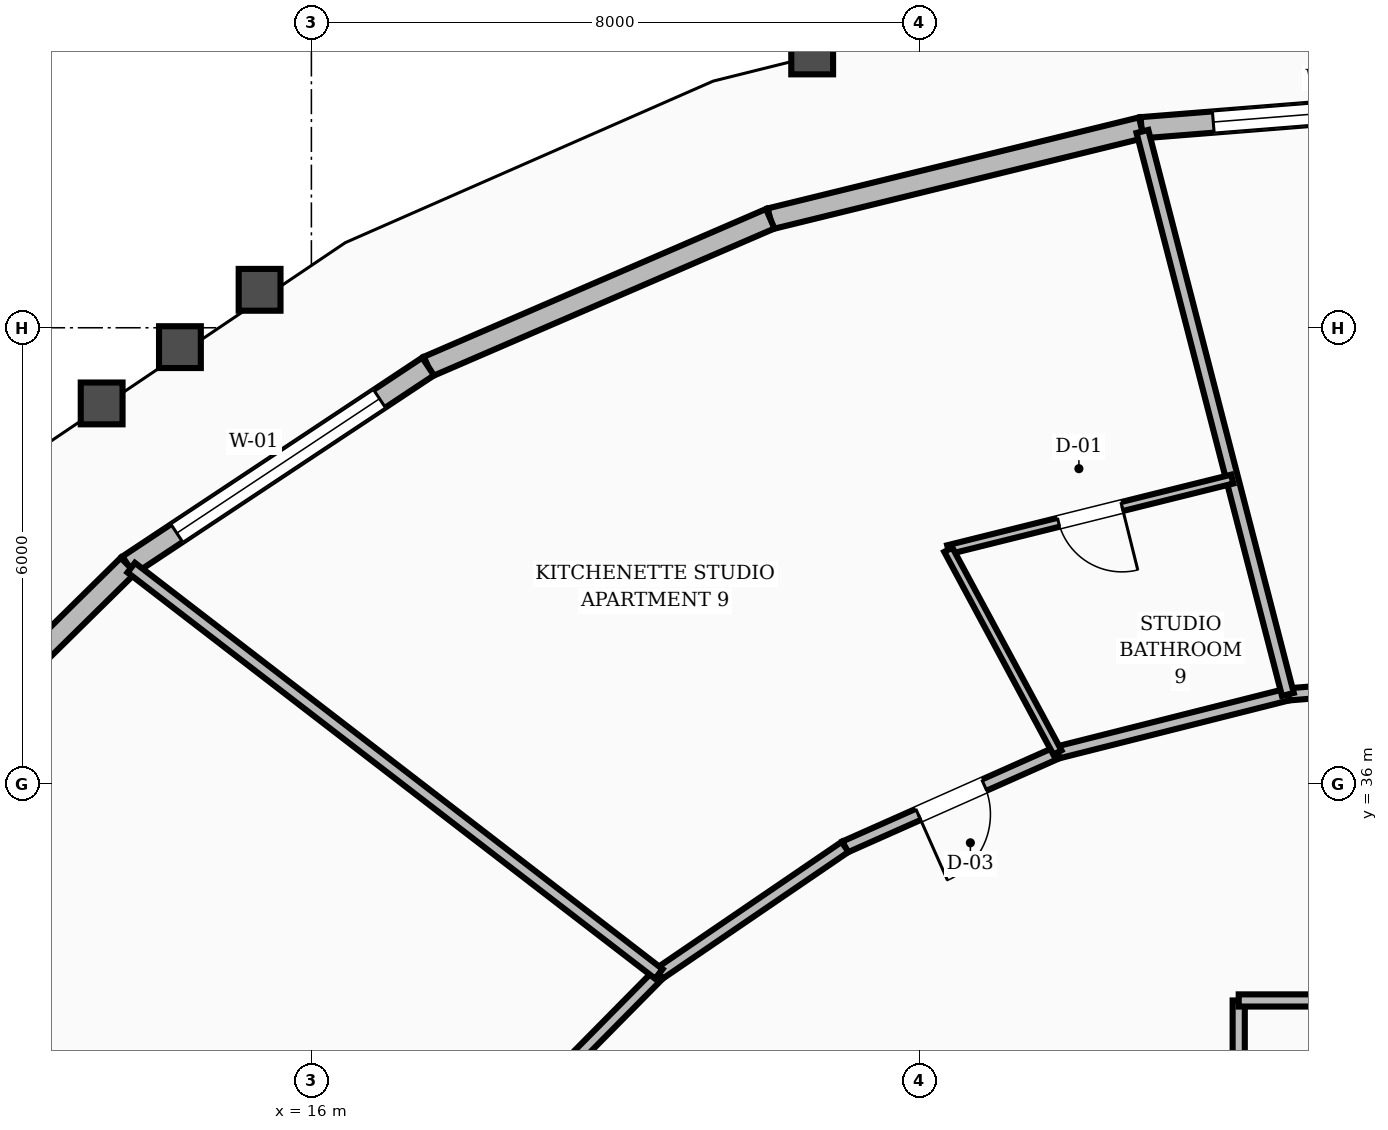
"""IFC4 building model, lengths in metres.
Left out: names, types, materials, properties, quantities, classifications, styles, units other than length and angle.
Written with IfcOpenShell. Run it as: python <this file> out.ifc"""

import sys

from ifc_helpers import new_model, si_unit, direction, frame, frame_2d, origin, place, context, subcontext, project, spatial, rectangle, extrude, element, fill, save


model = new_model("IFC4")
c1 = context("Model", 3, precision=1e-05, world=origin(), true_north=direction((0.0, 1.0)))
c2 = subcontext(c1, "Body", "Model", "MODEL_VIEW")
j1 = project(units=[si_unit("LENGTHUNIT", "METRE"), si_unit("PLANEANGLEUNIT", "RADIAN")], contexts=[c1])
p1 = place(None, origin())
s1 = spatial("IfcSite", under=j1, at=p1, CompositionType="ELEMENT")
p2 = place(p1, origin())
s2 = spatial("IfcBuilding", under=s1, at=p2, CompositionType="ELEMENT")
p3 = place(p2, frame((0.0, 0.0, 41.2)))
s3 = spatial("IfcBuildingStorey", under=s2, at=p3, CompositionType="ELEMENT", Elevation=41.2)
p4 = place(p3, frame((32.0, 45.035, 0.0), z_axis=(0.0, 0.0, 1.0), x_axis=(-0.996847191649, -0.079345299177, 0.0)))
e1 = element("IfcWall", 1, at=p4, inside=s3, PredefinedType="STANDARD", context=c2, shape_type="SweptSolid", body=[
    extrude(rectangle(XDim=5.095, YDim=0.28, at=frame_2d((2.548, 0.0))), origin(), (0.0, 0.0, 1.0), 2.65),
])
p5 = place(p4, frame((0.948, 0.0, 0.8)))
e2 = element("IfcOpeningElement", 2, at=p5, cuts=e1, PredefinedType="OPENING", context=c2, shape_type="SweptSolid", body=[
    extrude(rectangle(XDim=3.2, YDim=1.65, at=frame_2d((1.6, 0.825))), frame((0.0, 0.15, 0.0), z_axis=(0.0, -1.0, 0.0), x_axis=(1.0, 0.0, 0.0)), (0.0, 0.0, 1.0), 0.3),
])
p6 = place(p3, frame((26.921, 44.631, 0.0), z_axis=(0.0, 0.0, 1.0), x_axis=(-0.971254487448, -0.238043526716, 0.0)))
e3 = element("IfcWall", 3, at=p6, inside=s3, PredefinedType="STANDARD", context=c2, shape_type="SweptSolid", body=[
    extrude(rectangle(XDim=5.029, YDim=0.28, at=frame_2d((2.514, 0.0))), origin(), (0.0, 0.0, 1.0), 2.65),
])
p7 = place(p3, frame((22.037, 43.434, 0.0), z_axis=(0.0, 0.0, 1.0), x_axis=(-0.918052056251, -0.396459861793, 0.0)))
e4 = element("IfcWall", 4, at=p7, inside=s3, PredefinedType="STANDARD", context=c2, shape_type="SweptSolid", body=[
    extrude(rectangle(XDim=4.903, YDim=0.28, at=frame_2d((2.452, 0.0))), origin(), (0.0, 0.0, 1.0), 2.65),
])
p8 = place(p3, frame((17.535, 41.49, 0.0), z_axis=(0.0, 0.0, 1.0), x_axis=(-0.833436218894, -0.552615661229, 0.0)))
e5 = element("IfcWall", 5, at=p8, inside=s3, PredefinedType="STANDARD", context=c2, shape_type="SweptSolid", body=[
    extrude(rectangle(XDim=4.734, YDim=0.28, at=frame_2d((2.367, 0.0))), origin(), (0.0, 0.0, 1.0), 2.65),
])
p9 = place(p8, frame((0.767, 0.0, 0.8)))
e6 = element("IfcOpeningElement", 6, at=p9, cuts=e5, PredefinedType="OPENING", context=c2, shape_type="SweptSolid", body=[
    extrude(rectangle(XDim=3.2, YDim=1.65, at=frame_2d((1.6, 0.825))), frame((0.0, 0.15, 0.0), z_axis=(0.0, -1.0, 0.0), x_axis=(1.0, 0.0, 0.0)), (0.0, 0.0, 1.0), 0.3),
])
p10 = place(p3, frame((13.59, 38.874, 0.0), z_axis=(0.0, 0.0, 1.0), x_axis=(-0.712592855148, -0.701577809506, 0.0)))
e7 = element("IfcWall", 7, at=p10, inside=s3, PredefinedType="STANDARD", context=c2, shape_type="SweptSolid", body=[
    extrude(rectangle(XDim=4.544, YDim=0.28, at=frame_2d((2.272, 0.0))), origin(), (0.0, 0.0, 1.0), 2.65),
])
p11 = place(p3, frame((28.2, 31.45, 0.0), z_axis=(0.0, 0.0, 1.0), x_axis=(0.0, 1.0, 0.0)))
e8 = element("IfcWall", 8, at=p11, inside=s3, PredefinedType="SOLIDWALL", context=c2, shape_type="SweptSolid", body=[
    extrude(rectangle(XDim=1.7, YDim=0.16, at=frame_2d((0.85, 0.0))), origin(), (0.0, 0.0, 1.0), 2.61),
])
p12 = place(p3, frame((28.2, 33.15, 0.0), z_axis=(0.0, 0.0, 1.0), x_axis=(1.0, 0.0, 0.0)))
e9 = element("IfcWall", 9, at=p12, inside=s3, PredefinedType="SOLIDWALL", context=c2, shape_type="SweptSolid", body=[
    extrude(rectangle(XDim=7.6, YDim=0.16, at=frame_2d((3.8, 0.0))), origin(), (0.0, 0.0, 1.0), 2.61),
])
p13 = place(p12, frame((3.2, 0.0, 0.0)))
e10 = element("IfcOpeningElement", 10, at=p13, cuts=e9, PredefinedType="OPENING", context=c2, shape_type="SweptSolid", body=[
    extrude(rectangle(XDim=1.2, YDim=2.1, at=frame_2d((0.6, 1.05))), frame((0.0, 0.09, 0.0), z_axis=(0.0, -1.0, 0.0), x_axis=(1.0, 0.0, 0.0)), (0.0, 0.0, 1.0), 0.18),
])
p14 = place(p3, frame((32.0, 37.434, 0.0), z_axis=(0.0, 0.0, 1.0), x_axis=(-0.996661331307, -0.081646743207, 0.0)))
e11 = element("IfcWall", 11, at=p14, inside=s3, PredefinedType="SOLIDWALL", context=c2, shape_type="SweptSolid", body=[
    extrude(rectangle(XDim=3.164, YDim=0.16, at=frame_2d((1.582, 0.0))), origin(), (0.0, 0.0, 1.0), 2.61),
])
p15 = place(p14, frame((1.107, 0.0, 0.0)))
e12 = element("IfcOpeningElement", 12, at=p15, cuts=e11, PredefinedType="OPENING", context=c2, shape_type="SweptSolid", body=[
    extrude(rectangle(XDim=0.95, YDim=2.1, at=frame_2d((0.475, 1.05))), frame((0.0, 0.09, 0.0), z_axis=(0.0, -1.0, 0.0), x_axis=(1.0, 0.0, 0.0)), (0.0, 0.0, 1.0), 0.18),
])
p16 = place(p3, frame((28.847, 37.176, 0.0), z_axis=(0.0, 0.0, 1.0), x_axis=(-0.969653665365, -0.244482656326, 0.0)))
e13 = element("IfcWall", 13, at=p16, inside=s3, PredefinedType="SOLIDWALL", context=c2, shape_type="SweptSolid", body=[
    extrude(rectangle(XDim=3.127, YDim=0.16, at=frame_2d((1.563, 0.0))), origin(), (0.0, 0.0, 1.0), 2.61),
])
p17 = place(p3, frame((25.815, 36.411, 0.0), z_axis=(0.0, 0.0, 1.0), x_axis=(-0.913860932409, -0.406027334321, 0.0)))
e14 = element("IfcWall", 14, at=p17, inside=s3, PredefinedType="SOLIDWALL", context=c2, shape_type="SweptSolid", body=[
    extrude(rectangle(XDim=3.058, YDim=0.16, at=frame_2d((1.529, 0.0))), origin(), (0.0, 0.0, 1.0), 2.61),
])
p18 = place(p17, frame((1.054, 0.0, 0.0)))
e15 = element("IfcOpeningElement", 15, at=p18, cuts=e14, PredefinedType="OPENING", context=c2, shape_type="SweptSolid", body=[
    extrude(rectangle(XDim=0.95, YDim=2.1, at=frame_2d((0.475, 1.05))), frame((0.0, 0.09, 0.0), z_axis=(0.0, -1.0, 0.0), x_axis=(1.0, 0.0, 0.0)), (0.0, 0.0, 1.0), 0.18),
])
p19 = place(p3, frame((23.021, 35.17, 0.0), z_axis=(0.0, 0.0, 1.0), x_axis=(-0.826112340767, -0.563505457323, 0.0)))
e16 = element("IfcWall", 16, at=p19, inside=s3, PredefinedType="SOLIDWALL", context=c2, shape_type="SweptSolid", body=[
    extrude(rectangle(XDim=2.965, YDim=0.16, at=frame_2d((1.482, 0.0))), origin(), (0.0, 0.0, 1.0), 2.61),
])
p20 = place(p3, frame((20.572, 33.499, 0.0), z_axis=(0.0, 0.0, 1.0), x_axis=(-0.702569520063, -0.711615113301, 0.0)))
e17 = element("IfcWall", 17, at=p20, inside=s3, PredefinedType="SOLIDWALL", context=c2, shape_type="SweptSolid", body=[
    extrude(rectangle(XDim=2.861, YDim=0.16, at=frame_2d((1.43, 0.0))), origin(), (0.0, 0.0, 1.0), 2.61),
])
p21 = place(p3, frame((28.847, 37.176, 0.0), z_axis=(0.0, 0.0, 1.0), x_axis=(-0.250164663108, 0.968203305784, 0.0)))
e18 = element("IfcWall", 18, at=p21, inside=s3, PredefinedType="SOLIDWALL", context=c2, shape_type="SweptSolid", body=[
    extrude(rectangle(XDim=7.65, YDim=0.16, at=frame_2d((3.825, 0.0))), origin(), (0.0, 0.0, 1.0), 2.61),
])
p22 = place(p3, frame((28.115, 40.009, 0.0), z_axis=(0.0, 0.0, 1.0), x_axis=(-0.97045879352, -0.241266927034, 0.0)))
e19 = element("IfcWall", 19, at=p22, inside=s3, PredefinedType="PARTITIONING", context=c2, shape_type="SweptSolid", body=[
    extrude(rectangle(XDim=3.849, YDim=0.12, at=frame_2d((1.925, 0.0))), origin(), (0.0, 0.0, 1.0), 2.61),
])
p23 = place(p22, frame((1.495, 0.0, 0.0)))
e20 = element("IfcOpeningElement", 20, at=p23, cuts=e19, PredefinedType="OPENING", context=c2, shape_type="SweptSolid", body=[
    extrude(rectangle(XDim=0.86, YDim=2.1, at=frame_2d((0.43, 1.05))), frame((0.0, 0.07, 0.0), z_axis=(0.0, -1.0, 0.0), x_axis=(1.0, 0.0, 0.0)), (0.0, 0.0, 1.0), 0.14),
])
p24 = place(p3, frame((25.815, 36.411, 0.0), z_axis=(0.0, 0.0, 1.0), x_axis=(-0.473792323472, 0.880636607358, 0.0)))
e21 = element("IfcWall", 21, at=p24, inside=s3, PredefinedType="PARTITIONING", context=c2, shape_type="SweptSolid", body=[
    extrude(rectangle(XDim=3.031, YDim=0.12, at=frame_2d((1.515, 0.0))), origin(), (0.0, 0.0, 1.0), 2.61),
])
p25 = place(p3, frame((20.572, 33.499, 0.0), z_axis=(0.0, 0.0, 1.0), x_axis=(-0.792372185587, 0.610037965629, 0.0)))
e22 = element("IfcWall", 22, at=p25, inside=s3, PredefinedType="SOLIDWALL", context=c2, shape_type="SweptSolid", body=[
    extrude(rectangle(XDim=8.761, YDim=0.16, at=frame_2d((4.38, 0.0))), origin(), (0.0, 0.0, 1.0), 2.61),
])
p26 = place(p5, origin())
e23 = element("IfcWindow", 23, at=p26, inside=s3, PartitioningType="SINGLE_PANEL", PredefinedType="WINDOW", context=c2, shape_type="SweptSolid", body=[
    extrude(rectangle(XDim=3.2, YDim=1.65, at=frame_2d((1.6, 0.825))), frame((0.0, 0.03, 0.0), z_axis=(0.0, -1.0, 0.0), x_axis=(1.0, 0.0, 0.0)), (0.0, 0.0, 1.0), 0.06),
])
fill(e2, e23)
p27 = place(p9, origin())
e24 = element("IfcWindow", 24, at=p27, inside=s3, PartitioningType="SINGLE_PANEL", PredefinedType="WINDOW", context=c2, shape_type="SweptSolid", body=[
    extrude(rectangle(XDim=3.2, YDim=1.65, at=frame_2d((1.6, 0.825))), frame((0.0, 0.03, 0.0), z_axis=(0.0, -1.0, 0.0), x_axis=(1.0, 0.0, 0.0)), (0.0, 0.0, 1.0), 0.06),
])
fill(e6, e24)
p28 = place(p23, origin())
e25 = element("IfcDoor", 25, at=p28, inside=s3, OperationType="SINGLE_SWING_LEFT", PredefinedType="DOOR", context=c2, shape_type="SweptSolid", body=[
    extrude(rectangle(XDim=0.86, YDim=2.1, at=frame_2d((0.43, 1.05))), frame((0.0, 0.025, 0.0), z_axis=(0.0, -1.0, 0.0), x_axis=(1.0, 0.0, 0.0)), (0.0, 0.0, 1.0), 0.05),
])
fill(e20, e25)
p29 = place(p18, origin())
e26 = element("IfcDoor", 26, at=p29, inside=s3, OperationType="SINGLE_SWING_RIGHT", PredefinedType="DOOR", context=c2, shape_type="SweptSolid", body=[
    extrude(rectangle(XDim=0.95, YDim=2.1, at=frame_2d((0.475, 1.05))), frame((0.0, 0.025, 0.0), z_axis=(0.0, -1.0, 0.0), x_axis=(1.0, 0.0, 0.0)), (0.0, 0.0, 1.0), 0.05),
])
fill(e15, e26)
save(model, sys.argv[1])
